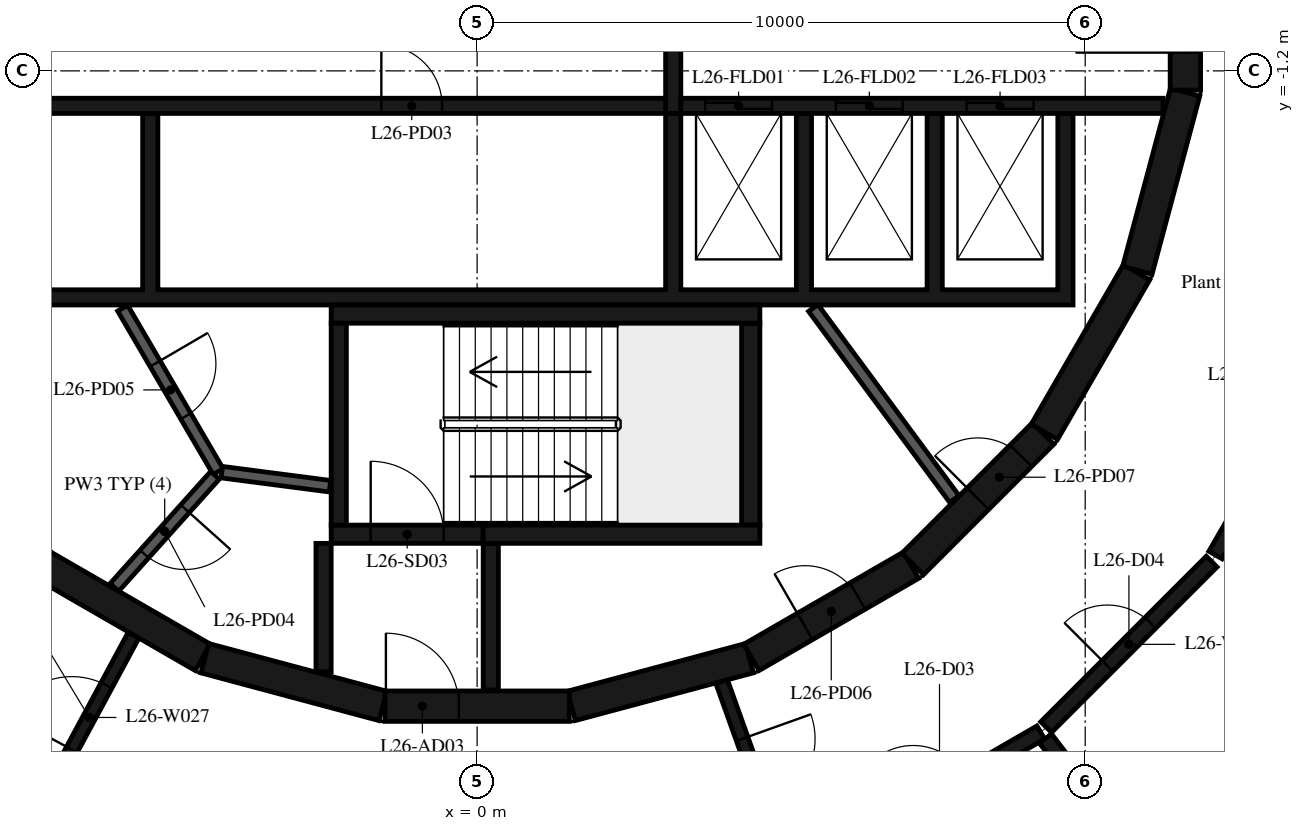
"""IFC4 building model, lengths in metres.
Left out: names, types, materials, properties, quantities, classifications, styles, units other than length and angle.
Written with IfcOpenShell. Run it as: python <this file> out.ifc"""

import sys

from ifc_helpers import new_model, si_unit, direction, frame, frame_2d, origin, place, context, subcontext, project, spatial, polyline, rectangle, outline, extrude, element, fill, save


model = new_model("IFC4")
c1 = context("Model", 3, precision=1e-05, world=origin(), true_north=direction((0.0, 1.0)))
c2 = subcontext(c1, "Body", "Model", "MODEL_VIEW")
j1 = project(units=[si_unit("LENGTHUNIT", "METRE"), si_unit("PLANEANGLEUNIT", "RADIAN")], contexts=[c1])
p1 = place(None, origin())
s1 = spatial("IfcSite", under=j1, at=p1, CompositionType="ELEMENT")
p2 = place(p1, origin())
s2 = spatial("IfcBuilding", under=s1, at=p2, CompositionType="ELEMENT")
p3 = place(p2, frame((0.0, 0.0, 108.2)))
s3 = spatial("IfcBuildingStorey", under=s2, at=p3, CompositionType="ELEMENT", Elevation=108.2)
p4 = place(p3, frame((1.55, -11.643, 0.0), z_axis=(0.0, 0.0, 1.0), x_axis=(0.965948410781, 0.258734743916, 0.0)))
e1 = element("IfcWall", 1, at=p4, inside=s3, PredefinedType="SHEAR", context=c2, shape_type="SweptSolid", body=[
    extrude(rectangle(XDim=3.033, YDim=0.5, at=frame_2d((1.516, 0.0))), origin(), (0.0, 0.0, 1.0), 4.75),
])
p5 = place(p3, frame((4.51, -10.845, 0.0), z_axis=(0.0, 0.0, 1.0), x_axis=(0.865975092491, 0.500087131594, 0.0)))
e2 = element("IfcWall", 2, at=p5, inside=s3, PredefinedType="SHEAR", context=c2, shape_type="SweptSolid", body=[
    extrude(rectangle(XDim=3.033, YDim=0.5, at=frame_2d((1.516, 0.0))), origin(), (0.0, 0.0, 1.0), 4.75),
])
p6 = place(p5, frame((1.016, 0.0, 0.0)))
e3 = element("IfcOpeningElement", 3, at=p6, cuts=e2, PredefinedType="OPENING", context=c2, shape_type="SweptSolid", body=[
    extrude(rectangle(XDim=1.0, YDim=2.4, at=frame_2d((0.5, 1.2))), frame((0.0, 0.26, 0.0), z_axis=(0.0, -1.0, 0.0), x_axis=(1.0, 0.0, 0.0)), (0.0, 0.0, 1.0), 0.52),
])
p7 = place(p3, frame((7.164, -9.308, 0.0), z_axis=(0.0, 0.0, 1.0), x_axis=(0.707106781187, 0.707106781187, 0.0)))
e4 = element("IfcWall", 4, at=p7, inside=s3, PredefinedType="SHEAR", context=c2, shape_type="SweptSolid", body=[
    extrude(rectangle(XDim=3.032, YDim=0.5, at=frame_2d((1.516, 0.0))), origin(), (0.0, 0.0, 1.0), 4.75),
])
p8 = place(p7, frame((1.516, 0.0, 0.0)))
e5 = element("IfcOpeningElement", 5, at=p8, cuts=e4, PredefinedType="OPENING", context=c2, shape_type="SweptSolid", body=[
    extrude(rectangle(XDim=1.0, YDim=2.4, at=frame_2d((0.5, 1.2))), frame((0.0, 0.26, 0.0), z_axis=(0.0, -1.0, 0.0), x_axis=(1.0, 0.0, 0.0)), (0.0, 0.0, 1.0), 0.52),
])
for number, where, z_axis, x_axis in (
    (6, (9.329, -7.137, 0.0), (0.0, 0.0, 1.0), (0.5, 0.866, 0.0)),
    (7, (10.858, -4.479, 0.0), (0.0, 0.0, 1.0), (0.259, 0.966, 0.0)),
):
    element("IfcWall", number, at=place(p3, frame(where, z_axis=z_axis, x_axis=x_axis)), inside=s3, PredefinedType="SHEAR", context=c2, shape_type="SweptSolid", body=[
        extrude(rectangle(XDim=3.033, YDim=0.5, at=frame_2d((1.516, 0.0))), origin(), (0.0, 0.0, 1.0), 4.75),
    ])
p9 = place(p3, frame((11.647, -1.516, 0.0), z_axis=(0.0, 0.0, 1.0), x_axis=(0.0, 1.0, 0.0)))
e8 = element("IfcWall", 8, at=p9, inside=s3, PredefinedType="SHEAR", context=c2, shape_type="SweptSolid", body=[
    extrude(rectangle(XDim=3.033, YDim=0.5, at=frame_2d((1.516, 0.0))), origin(), (0.0, 0.0, 1.0), 4.75),
])
p10 = place(p9, frame((0.616, 0.0, 0.0)))
e9 = element("IfcOpeningElement", 9, at=p10, cuts=e8, PredefinedType="OPENING", context=c2, shape_type="SweptSolid", body=[
    extrude(rectangle(XDim=1.8, YDim=2.1, at=frame_2d((0.9, 1.05))), frame((0.0, 0.26, 0.0), z_axis=(0.0, -1.0, 0.0), x_axis=(1.0, 0.0, 0.0)), (0.0, 0.0, 1.0), 0.52),
])
for number, where, z_axis, x_axis in (
    (10, (-7.137, -9.329, 0.0), (0.0, 0.0, 1.0), (0.866, -0.5, 0.0)),
    (11, (-4.479, -10.858, 0.0), (0.0, 0.0, 1.0), (0.966, -0.259, 0.0)),
):
    element("IfcWall", number, at=place(p3, frame(where, z_axis=z_axis, x_axis=x_axis)), inside=s3, PredefinedType="SHEAR", context=c2, shape_type="SweptSolid", body=[
        extrude(rectangle(XDim=3.033, YDim=0.5, at=frame_2d((1.516, 0.0))), origin(), (0.0, 0.0, 1.0), 4.75),
    ])
p11 = place(p3, frame((-1.516, -11.647, 0.0), z_axis=(0.0, 0.0, 1.0), x_axis=(1.0, 0.0, 0.0)))
e12 = element("IfcWall", 12, at=p11, inside=s3, PredefinedType="SHEAR", context=c2, shape_type="SweptSolid", body=[
    extrude(rectangle(XDim=3.033, YDim=0.5, at=frame_2d((1.516, 0.0))), origin(), (0.0, 0.0, 1.0), 4.75),
])
p12 = place(p11, frame((0.016, 0.0, 0.0)))
e13 = element("IfcOpeningElement", 13, at=p12, cuts=e12, PredefinedType="OPENING", context=c2, shape_type="SweptSolid", body=[
    extrude(rectangle(XDim=1.2, YDim=2.1, at=frame_2d((0.6, 1.05))), frame((0.0, 0.26, 0.0), z_axis=(0.0, -1.0, 0.0), x_axis=(1.0, 0.0, 0.0)), (0.0, 0.0, 1.0), 0.52),
])
p13 = place(p3, frame((-2.275, -8.67, 0.0), z_axis=(0.0, 0.0, 1.0), x_axis=(0.0, 1.0, 0.0)))
e14 = element("IfcWall", 14, at=p13, inside=s3, PredefinedType="SHEAR", context=c2, shape_type="SweptSolid", body=[
    extrude(rectangle(XDim=3.32, YDim=0.25, at=frame_2d((1.66, 0.0))), origin(), (0.0, 0.0, 1.0), 4.75),
])
p14 = place(p3, frame((-2.4, -5.2, 0.0), z_axis=(0.0, 0.0, 1.0), x_axis=(1.0, 0.0, 0.0)))
e15 = element("IfcWall", 15, at=p14, inside=s3, PredefinedType="SHEAR", context=c2, shape_type="SweptSolid", body=[
    extrude(rectangle(XDim=7.05, YDim=0.3, at=frame_2d((3.525, 0.0))), origin(), (0.0, 0.0, 1.0), 4.75),
])
p15 = place(p3, frame((4.5, -8.67, 0.0), z_axis=(0.0, 0.0, 1.0), x_axis=(0.0, 1.0, 0.0)))
e16 = element("IfcWall", 16, at=p15, inside=s3, PredefinedType="SHEAR", context=c2, shape_type="SweptSolid", body=[
    extrude(rectangle(XDim=3.32, YDim=0.3, at=frame_2d((1.66, 0.0))), origin(), (0.0, 0.0, 1.0), 4.75),
])
p16 = place(p3, frame((0.1, -8.82, 0.0), z_axis=(0.0, 0.0, 1.0), x_axis=(1.0, 0.0, 0.0)))
e17 = element("IfcWall", 17, at=p16, inside=s3, PredefinedType="SHEAR", context=c2, shape_type="SweptSolid", body=[
    extrude(rectangle(XDim=4.55, YDim=0.3, at=frame_2d((2.275, 0.0))), origin(), (0.0, 0.0, 1.0), 4.75),
])
p17 = place(p3, frame((-2.4, -8.82, 0.0), z_axis=(0.0, 0.0, 1.0), x_axis=(1.0, 0.0, 0.0)))
e18 = element("IfcWall", 18, at=p17, inside=s3, PredefinedType="SHEAR", context=c2, shape_type="SweptSolid", body=[
    extrude(rectangle(XDim=2.5, YDim=0.3, at=frame_2d((1.25, 0.0))), origin(), (0.0, 0.0, 1.0), 4.75),
])
p18 = place(p17, frame((0.65, 0.0, 0.0)))
e19 = element("IfcOpeningElement", 19, at=p18, cuts=e18, PredefinedType="OPENING", context=c2, shape_type="SweptSolid", body=[
    extrude(rectangle(XDim=1.2, YDim=2.1, at=frame_2d((0.6, 1.05))), frame((0.0, 0.16, 0.0), z_axis=(0.0, -1.0, 0.0), x_axis=(1.0, 0.0, 0.0)), (0.0, 0.0, 1.0), 0.32),
])
p19 = place(p3, frame((-2.525, -8.97, 0.0), z_axis=(0.0, 0.0, 1.0), x_axis=(0.0, -1.0, 0.0)))
e20 = element("IfcWall", 20, at=p19, inside=s3, PredefinedType="SHEAR", context=c2, shape_type="SweptSolid", body=[
    extrude(rectangle(XDim=2.11, YDim=0.25, at=frame_2d((1.055, 0.0))), origin(), (0.0, 0.0, 1.0), 4.75),
])
p20 = place(p3, frame((0.225, -8.97, 0.0), z_axis=(0.0, 0.0, 1.0), x_axis=(0.0, -1.0, 0.0)))
e21 = element("IfcWall", 21, at=p20, inside=s3, PredefinedType="SHEAR", context=c2, shape_type="SweptSolid", body=[
    extrude(rectangle(XDim=2.41, YDim=0.25, at=frame_2d((1.205, 0.0))), origin(), (0.0, 0.0, 1.0), 4.75),
])
p21 = place(p3, origin())
e22 = element("IfcWall", 22, at=p21, inside=s3, PredefinedType="SHEAR", context=c2, shape_type="SweptSolid", body=[
    extrude(outline(polyline([(9.8, -5.05), (9.8, -4.8), (9.8, -1.9), (9.55, -1.9), (9.55, -4.8), (7.65, -4.8), (7.65, -1.9), (7.4, -1.9), (7.4, -4.8), (5.5, -4.8), (5.5, -1.9), (5.25, -1.9), (5.25, -4.8), (3.35, -4.8), (3.35, -1.9), (3.1, -1.9), (3.1, -4.8), (-5.25, -4.8), (-5.25, -1.9), (-5.5, -1.9), (-5.5, -4.8), (-7.4, -4.8), (-7.4, -1.9), (-7.65, -1.9), (-7.65, -4.8), (-9.55, -4.8), (-9.55, -1.9), (-9.8, -1.9), (-9.8, -4.8), (-9.8, -5.05), (9.8, -5.05)])), origin(), (0.0, 0.0, 1.0), 4.75),
])
p22 = place(p3, frame((-11.28, -1.775, 0.0), z_axis=(0.0, 0.0, 1.0), x_axis=(1.0, 0.0, 0.0)))
e23 = element("IfcWall", 23, at=p22, inside=s3, PredefinedType="SHEAR", context=c2, shape_type="SweptSolid", body=[
    extrude(rectangle(XDim=14.38, YDim=0.25, at=frame_2d((7.19, 0.0))), origin(), (0.0, 0.0, 1.0), 4.75),
])
p23 = place(p22, frame((9.705, 0.0, 0.0)))
e24 = element("IfcOpeningElement", 24, at=p23, cuts=e23, PredefinedType="OPENING", context=c2, shape_type="SweptSolid", body=[
    extrude(rectangle(XDim=1.0, YDim=2.4, at=frame_2d((0.5, 1.2))), frame((0.0, 0.135, 0.0), z_axis=(0.0, -1.0, 0.0), x_axis=(1.0, 0.0, 0.0)), (0.0, 0.0, 1.0), 0.27),
])
p24 = place(p3, frame((3.35, -1.775, 0.0), z_axis=(0.0, 0.0, 1.0), x_axis=(1.0, 0.0, 0.0)))
e25 = element("IfcWall", 25, at=p24, inside=s3, PredefinedType="SHEAR", context=c2, shape_type="SweptSolid", body=[
    extrude(rectangle(XDim=7.93, YDim=0.25, at=frame_2d((3.965, 0.0))), origin(), (0.0, 0.0, 1.0), 4.75),
])
p25 = place(p24, frame((0.4, 0.0, 0.0)))
e26 = element("IfcOpeningElement", 26, at=p25, cuts=e25, PredefinedType="OPENING", context=c2, shape_type="SweptSolid", body=[
    extrude(rectangle(XDim=1.1, YDim=2.4, at=frame_2d((0.55, 1.2))), frame((0.0, 0.135, 0.0), z_axis=(0.0, -1.0, 0.0), x_axis=(1.0, 0.0, 0.0)), (0.0, 0.0, 1.0), 0.27),
])
p26 = place(p24, frame((2.55, 0.0, 0.0)))
e27 = element("IfcOpeningElement", 27, at=p26, cuts=e25, PredefinedType="OPENING", context=c2, shape_type="SweptSolid", body=[
    extrude(rectangle(XDim=1.1, YDim=2.4, at=frame_2d((0.55, 1.2))), frame((0.0, 0.135, 0.0), z_axis=(0.0, -1.0, 0.0), x_axis=(1.0, 0.0, 0.0)), (0.0, 0.0, 1.0), 0.27),
])
p27 = place(p24, frame((4.7, 0.0, 0.0)))
e28 = element("IfcOpeningElement", 28, at=p27, cuts=e25, PredefinedType="OPENING", context=c2, shape_type="SweptSolid", body=[
    extrude(rectangle(XDim=1.1, YDim=2.4, at=frame_2d((0.55, 1.2))), frame((0.0, 0.135, 0.0), z_axis=(0.0, -1.0, 0.0), x_axis=(1.0, 0.0, 0.0)), (0.0, 0.0, 1.0), 0.27),
])
p28 = place(p3, frame((3.225, -1.9, 0.0), z_axis=(0.0, 0.0, 1.0), x_axis=(0.0, 1.0, 0.0)))
e29 = element("IfcWall", 29, at=p28, inside=s3, PredefinedType="SHEAR", context=c2, shape_type="SweptSolid", body=[
    extrude(rectangle(XDim=3.8, YDim=0.25, at=frame_2d((1.9, 0.0))), origin(), (0.0, 0.0, 1.0), 4.75),
])
p29 = place(p3, frame((5.528, -5.098, 0.0), z_axis=(0.0, 0.0, 1.0), x_axis=(0.594034318069, -0.804439698769, 0.0)))
e30 = element("IfcWall", 30, at=p29, inside=s3, PredefinedType="PARTITIONING", context=c2, shape_type="SweptSolid", body=[
    extrude(rectangle(XDim=3.907, YDim=0.19, at=frame_2d((1.953, 0.0))), origin(), (0.0, 0.0, 1.0), 4.75),
])
p30 = place(p3, frame((-5.829, -5.102, 0.0), z_axis=(0.0, 0.0, 1.0), x_axis=(0.504480008384, -0.863423373057, 0.0)))
e31 = element("IfcWall", 31, at=p30, inside=s3, PredefinedType="PARTITIONING", context=c2, shape_type="SweptSolid", body=[
    extrude(rectangle(XDim=3.115, YDim=0.19, at=frame_2d((1.558, 0.0))), origin(), (0.0, 0.0, 1.0), 4.75),
])
p31 = place(p30, frame((1.058, 0.0, 0.0)))
e32 = element("IfcOpeningElement", 32, at=p31, cuts=e31, PredefinedType="OPENING", context=c2, shape_type="SweptSolid", body=[
    extrude(rectangle(XDim=1.0, YDim=2.4, at=frame_2d((0.5, 1.2))), frame((0.0, 0.105, 0.0), z_axis=(0.0, -1.0, 0.0), x_axis=(1.0, 0.0, 0.0)), (0.0, 0.0, 1.0), 0.21),
])
p32 = place(p3, frame((-4.311, -7.851, 0.0), z_axis=(0.0, 0.0, 1.0), x_axis=(-0.667869133096, -0.744278725383, 0.0)))
e33 = element("IfcWall", 33, at=p32, inside=s3, PredefinedType="PARTITIONING", context=c2, shape_type="SweptSolid", body=[
    extrude(rectangle(XDim=2.476, YDim=0.19, at=frame_2d((1.238, 0.0))), origin(), (0.0, 0.0, 1.0), 4.75),
])
p33 = place(p32, frame((0.738, 0.0, 0.0)))
e34 = element("IfcOpeningElement", 34, at=p33, cuts=e33, PredefinedType="OPENING", context=c2, shape_type="SweptSolid", body=[
    extrude(rectangle(XDim=1.0, YDim=2.4, at=frame_2d((0.5, 1.2))), frame((0.0, 0.105, 0.0), z_axis=(0.0, -1.0, 0.0), x_axis=(1.0, 0.0, 0.0)), (0.0, 0.0, 1.0), 0.21),
])
p34 = place(p3, frame((-4.198, -7.799, 0.0), z_axis=(0.0, 0.0, 1.0), x_axis=(0.991686747293, -0.128675542523, 0.0)))
e35 = element("IfcWall", 35, at=p34, inside=s3, PredefinedType="PARTITIONING", context=c2, shape_type="SweptSolid", body=[
    extrude(rectangle(XDim=1.793, YDim=0.19, at=frame_2d((0.896, 0.0))), origin(), (0.0, 0.0, 1.0), 4.75),
])
p35 = place(p3, frame((-7.109, -13.186, 0.0), z_axis=(0.0, 0.0, 1.0), x_axis=(0.474511788195, 0.880249148176, 0.0)))
e36 = element("IfcWall", 36, at=p35, inside=s3, PredefinedType="PARTITIONING", context=c2, shape_type="SweptSolid", body=[
    extrude(rectangle(XDim=3.074, YDim=0.2, at=frame_2d((1.537, 0.0))), origin(), (0.0, 0.0, 1.0), 4.75),
])
p36 = place(p35, frame((0.937, 0.0, 0.0)))
e37 = element("IfcOpeningElement", 37, at=p36, cuts=e36, PredefinedType="OPENING", context=c2, shape_type="SweptSolid", body=[
    extrude(rectangle(XDim=1.2, YDim=2.1, at=frame_2d((0.6, 1.05))), frame((0.0, 0.11, 0.0), z_axis=(0.0, -1.0, 0.0), x_axis=(1.0, 0.0, 0.0)), (0.0, 0.0, 1.0), 0.22),
])
p37 = place(p3, frame((4.02, -11.24, 0.0), z_axis=(0.0, 0.0, 1.0), x_axis=(0.336751058688, -0.941593715183, 0.0)))
e38 = element("IfcWall", 38, at=p37, inside=s3, PredefinedType="PARTITIONING", context=c2, shape_type="SweptSolid", body=[
    extrude(rectangle(XDim=3.207, YDim=0.2, at=frame_2d((1.604, 0.0))), origin(), (0.0, 0.0, 1.0), 4.75),
])
p38 = place(p37, frame((1.004, 0.0, 0.0)))
e39 = element("IfcOpeningElement", 39, at=p38, cuts=e38, PredefinedType="OPENING", context=c2, shape_type="SweptSolid", body=[
    extrude(rectangle(XDim=1.2, YDim=2.1, at=frame_2d((0.6, 1.05))), frame((0.0, 0.11, 0.0), z_axis=(0.0, -1.0, 0.0), x_axis=(1.0, 0.0, 0.0)), (0.0, 0.0, 1.0), 0.22),
])
p39 = place(p3, frame((5.938, -14.007, 0.0), z_axis=(0.0, 0.0, 1.0), x_axis=(0.865615852585, 0.500708693508, 0.0)))
e40 = element("IfcWall", 40, at=p39, inside=s3, PredefinedType="PARTITIONING", context=c2, shape_type="SweptSolid", body=[
    extrude(rectangle(XDim=3.849, YDim=0.25, at=frame_2d((1.925, 0.0))), origin(), (0.0, 0.0, 1.0), 4.75),
])
p40 = place(p39, frame((1.425, 0.0, 0.0)))
e41 = element("IfcOpeningElement", 41, at=p40, cuts=e40, PredefinedType="OPENING", context=c2, shape_type="SweptSolid", body=[
    extrude(rectangle(XDim=1.0, YDim=2.1, at=frame_2d((0.5, 1.05))), frame((0.0, 0.135, 0.0), z_axis=(0.0, -1.0, 0.0), x_axis=(1.0, 0.0, 0.0)), (0.0, 0.0, 1.0), 0.27),
])
p41 = place(p3, frame((9.358, -11.992, 0.0), z_axis=(0.0, 0.0, 1.0), x_axis=(0.707106781187, 0.707106781187, 0.0)))
e42 = element("IfcWall", 42, at=p41, inside=s3, PredefinedType="PARTITIONING", context=c2, shape_type="SweptSolid", body=[
    extrude(rectangle(XDim=3.849, YDim=0.25, at=frame_2d((1.925, 0.0))), origin(), (0.0, 0.0, 1.0), 4.75),
])
p42 = place(p41, frame((1.425, 0.0, 0.0)))
e43 = element("IfcOpeningElement", 43, at=p42, cuts=e42, PredefinedType="OPENING", context=c2, shape_type="SweptSolid", body=[
    extrude(rectangle(XDim=1.0, YDim=2.1, at=frame_2d((0.5, 1.05))), frame((0.0, 0.135, 0.0), z_axis=(0.0, -1.0, 0.0), x_axis=(1.0, 0.0, 0.0)), (0.0, 0.0, 1.0), 0.27),
])
p43 = place(p3, frame((9.346, -12.179, 0.0), z_axis=(0.0, 0.0, 1.0), x_axis=(0.609251025239, -0.792977419758, 0.0)))
e44 = element("IfcWall", 44, at=p43, inside=s3, PredefinedType="PARTITIONING", context=c2, shape_type="SweptSolid", body=[
    extrude(rectangle(XDim=7.033, YDim=0.25, at=frame_2d((3.517, 0.0))), origin(), (0.0, 0.0, 1.0), 4.75),
])
p44 = place(p3, frame((12.143, -9.162, 0.0), z_axis=(0.0, 0.0, 1.0), x_axis=(0.501027157918, 0.865431561147, 0.0)))
e45 = element("IfcWall", 45, at=p44, inside=s3, PredefinedType="PARTITIONING", context=c2, shape_type="SweptSolid", body=[
    extrude(rectangle(XDim=3.168, YDim=0.25, at=frame_2d((1.584, 0.0))), origin(), (0.0, 0.0, 1.0), 4.75),
])
p45 = place(p18, origin())
e46 = element("IfcDoor", 46, at=p45, inside=s3, OperationType="SINGLE_SWING_LEFT", PredefinedType="DOOR", context=c2, shape_type="SweptSolid", body=[
    extrude(rectangle(XDim=1.2, YDim=2.1, at=frame_2d((0.6, 1.05))), frame((0.0, 0.025, 0.0), z_axis=(0.0, -1.0, 0.0), x_axis=(1.0, 0.0, 0.0)), (0.0, 0.0, 1.0), 0.05),
])
fill(e19, e46)
p46 = place(p12, origin())
e47 = element("IfcDoor", 47, at=p46, inside=s3, OperationType="SINGLE_SWING_RIGHT", PredefinedType="DOOR", context=c2, shape_type="SweptSolid", body=[
    extrude(rectangle(XDim=1.2, YDim=2.1, at=frame_2d((0.6, 1.05))), frame((0.0, 0.025, 0.0), z_axis=(0.0, -1.0, 0.0), x_axis=(1.0, 0.0, 0.0)), (0.0, 0.0, 1.0), 0.05),
])
fill(e13, e47)
p47 = place(p10, origin())
e48 = element("IfcDoor", 48, at=p47, inside=s3, OperationType="DOUBLE_DOOR_SINGLE_SWING", PredefinedType="DOOR", context=c2, shape_type="SweptSolid", body=[
    extrude(rectangle(XDim=1.8, YDim=2.1, at=frame_2d((0.9, 1.05))), frame((0.0, 0.025, 0.0), z_axis=(0.0, -1.0, 0.0), x_axis=(1.0, 0.0, 0.0)), (0.0, 0.0, 1.0), 0.05),
])
fill(e9, e48)
p48 = place(p25, origin())
e49 = element("IfcDoor", 49, at=p48, inside=s3, OperationType="DOUBLE_DOOR_SLIDING", PredefinedType="DOOR", context=c2, shape_type="SweptSolid", body=[
    extrude(rectangle(XDim=1.1, YDim=2.4, at=frame_2d((0.55, 1.2))), frame((0.0, 0.025, 0.0), z_axis=(0.0, -1.0, 0.0), x_axis=(1.0, 0.0, 0.0)), (0.0, 0.0, 1.0), 0.05),
])
fill(e26, e49)
p49 = place(p26, origin())
e50 = element("IfcDoor", 50, at=p49, inside=s3, OperationType="DOUBLE_DOOR_SLIDING", PredefinedType="DOOR", context=c2, shape_type="SweptSolid", body=[
    extrude(rectangle(XDim=1.1, YDim=2.4, at=frame_2d((0.55, 1.2))), frame((0.0, 0.025, 0.0), z_axis=(0.0, -1.0, 0.0), x_axis=(1.0, 0.0, 0.0)), (0.0, 0.0, 1.0), 0.05),
])
fill(e27, e50)
p50 = place(p27, origin())
e51 = element("IfcDoor", 51, at=p50, inside=s3, OperationType="DOUBLE_DOOR_SLIDING", PredefinedType="DOOR", context=c2, shape_type="SweptSolid", body=[
    extrude(rectangle(XDim=1.1, YDim=2.4, at=frame_2d((0.55, 1.2))), frame((0.0, 0.025, 0.0), z_axis=(0.0, -1.0, 0.0), x_axis=(1.0, 0.0, 0.0)), (0.0, 0.0, 1.0), 0.05),
])
fill(e28, e51)
p51 = place(p23, origin())
e52 = element("IfcDoor", 52, at=p51, inside=s3, OperationType="SINGLE_SWING_RIGHT", PredefinedType="DOOR", context=c2, shape_type="SweptSolid", body=[
    extrude(rectangle(XDim=1.0, YDim=2.4, at=frame_2d((0.5, 1.2))), frame((0.0, 0.025, 0.0), z_axis=(0.0, -1.0, 0.0), x_axis=(1.0, 0.0, 0.0)), (0.0, 0.0, 1.0), 0.05),
])
fill(e24, e52)
p52 = place(p33, origin())
e53 = element("IfcDoor", 53, at=p52, inside=s3, OperationType="SINGLE_SWING_LEFT", PredefinedType="DOOR", context=c2, shape_type="SweptSolid", body=[
    extrude(rectangle(XDim=1.0, YDim=2.4, at=frame_2d((0.5, 1.2))), frame((0.0, 0.025, 0.0), z_axis=(0.0, -1.0, 0.0), x_axis=(1.0, 0.0, 0.0)), (0.0, 0.0, 1.0), 0.05),
])
fill(e34, e53)
p53 = place(p31, origin())
e54 = element("IfcDoor", 54, at=p53, inside=s3, OperationType="SINGLE_SWING_RIGHT", PredefinedType="DOOR", context=c2, shape_type="SweptSolid", body=[
    extrude(rectangle(XDim=1.0, YDim=2.4, at=frame_2d((0.5, 1.2))), frame((0.0, 0.025, 0.0), z_axis=(0.0, -1.0, 0.0), x_axis=(1.0, 0.0, 0.0)), (0.0, 0.0, 1.0), 0.05),
])
fill(e32, e54)
p54 = place(p6, origin())
e55 = element("IfcDoor", 55, at=p54, inside=s3, OperationType="SINGLE_SWING_LEFT", PredefinedType="DOOR", context=c2, shape_type="SweptSolid", body=[
    extrude(rectangle(XDim=1.0, YDim=2.4, at=frame_2d((0.5, 1.2))), frame((0.0, 0.025, 0.0), z_axis=(0.0, -1.0, 0.0), x_axis=(1.0, 0.0, 0.0)), (0.0, 0.0, 1.0), 0.05),
])
fill(e3, e55)
p55 = place(p8, origin())
e56 = element("IfcDoor", 56, at=p55, inside=s3, OperationType="SINGLE_SWING_RIGHT", PredefinedType="DOOR", context=c2, shape_type="SweptSolid", body=[
    extrude(rectangle(XDim=1.0, YDim=2.4, at=frame_2d((0.5, 1.2))), frame((0.0, 0.025, 0.0), z_axis=(0.0, -1.0, 0.0), x_axis=(1.0, 0.0, 0.0)), (0.0, 0.0, 1.0), 0.05),
])
fill(e5, e56)
p56 = place(p42, origin())
e57 = element("IfcDoor", 57, at=p56, inside=s3, OperationType="SINGLE_SWING_LEFT", PredefinedType="DOOR", context=c2, shape_type="SweptSolid", body=[
    extrude(rectangle(XDim=1.0, YDim=2.1, at=frame_2d((0.5, 1.05))), frame((0.0, 0.025, 0.0), z_axis=(0.0, -1.0, 0.0), x_axis=(1.0, 0.0, 0.0)), (0.0, 0.0, 1.0), 0.05),
])
fill(e43, e57)
p57 = place(p38, origin())
e58 = element("IfcDoor", 58, at=p57, inside=s3, OperationType="SINGLE_SWING_LEFT", PredefinedType="DOOR", context=c2, shape_type="SweptSolid", body=[
    extrude(rectangle(XDim=1.2, YDim=2.1, at=frame_2d((0.6, 1.05))), frame((0.0, 0.025, 0.0), z_axis=(0.0, -1.0, 0.0), x_axis=(1.0, 0.0, 0.0)), (0.0, 0.0, 1.0), 0.05),
])
fill(e39, e58)
p58 = place(p36, origin())
e59 = element("IfcDoor", 59, at=p58, inside=s3, OperationType="SINGLE_SWING_LEFT", PredefinedType="DOOR", context=c2, shape_type="SweptSolid", body=[
    extrude(rectangle(XDim=1.2, YDim=2.1, at=frame_2d((0.6, 1.05))), frame((0.0, 0.025, 0.0), z_axis=(0.0, -1.0, 0.0), x_axis=(1.0, 0.0, 0.0)), (0.0, 0.0, 1.0), 0.05),
])
fill(e37, e59)
save(model, sys.argv[1])
